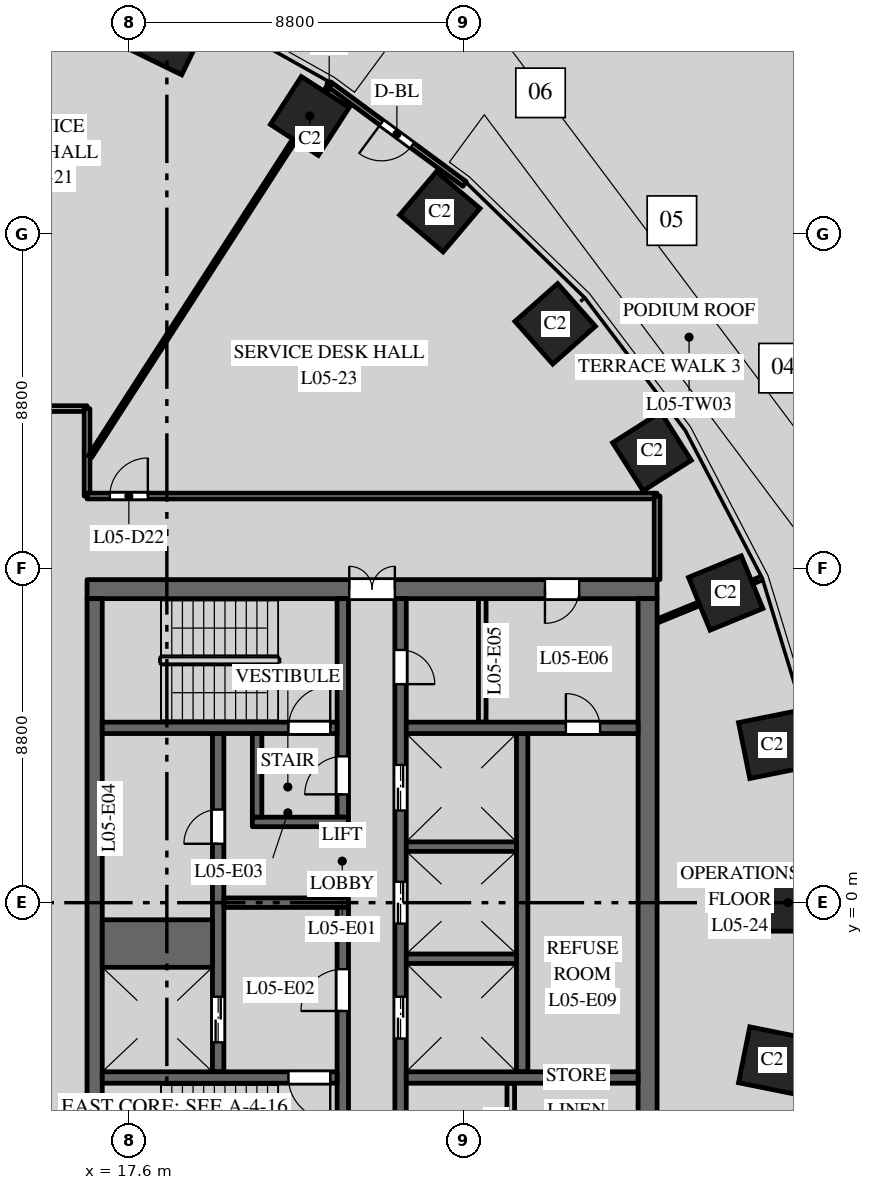
"""IFC4 building model, lengths in metres.
Left out: names, types, materials, properties, quantities, classifications, styles, units other than length and angle.
Written with IfcOpenShell. Run it as: python <this file> out.ifc"""

import sys

from ifc_helpers import new_model, si_unit, direction, frame, frame_2d, origin, origin_2d, place, context, subcontext, project, spatial, rectangle, extrude, element, fill, save


model = new_model("IFC4")
c1 = context("Model", 3, precision=1e-05, world=origin(), true_north=direction((0.0, 1.0)))
c2 = subcontext(c1, "Body", "Model", "MODEL_VIEW")
j1 = project(units=[si_unit("LENGTHUNIT", "METRE"), si_unit("PLANEANGLEUNIT", "RADIAN")], contexts=[c1])
p1 = place(None, origin())
s1 = spatial("IfcSite", under=j1, at=p1, CompositionType="ELEMENT")
p2 = place(p1, origin())
s2 = spatial("IfcBuilding", under=s1, at=p2, CompositionType="ELEMENT")
p3 = place(p2, frame((0.0, 0.0, 30.5)))
s3 = spatial("IfcBuildingStorey", under=s2, at=p3, CompositionType="ELEMENT", Elevation=30.5)
for number, where, z_axis, x_axis in (
    (1, (34.945, 0.0, 0.0), (0.0, 0.0, 1.0), (0.0, 1.0, 0.0)),
    (2, (34.527, 4.151, 0.0), (0.0, 0.0, 1.0), (-0.197, 0.98, 0.0)),
    (3, (33.305, 8.149, 0.0), (0.0, 0.0, 1.0), (-0.379, 0.925, 0.0)),
    (4, (31.365, 11.871, 0.0), (0.0, 0.0, 1.0), (-0.535, 0.845, 0.0)),
    (5, (28.819, 15.23, 0.0), (0.0, 0.0, 1.0), (-0.663, 0.749, 0.0)),
    (6, (25.783, 18.18, 0.0), (0.0, 0.0, 1.0), (-0.763, 0.646, 0.0)),
    (7, (22.362, 20.7, 0.0), (0.0, 0.0, 1.0), (-0.84, 0.542, 0.0)),
    (8, (18.646, 22.785, 0.0), (0.0, 0.0, 1.0), (-0.898, 0.439, 0.0)),
    (9, (34.527, -4.151, 0.0), (0.0, 0.0, 1.0), (0.197, 0.98, 0.0)),
):
    element("IfcColumn", number, at=place(p3, frame(where, z_axis=z_axis, x_axis=x_axis)), inside=s3, PredefinedType="COLUMN", context=c2, shape_type="SweptSolid", body=[
        extrude(rectangle(XDim=1.5, YDim=1.5, at=origin_2d()), origin(), (0.0, 0.0, 1.0), 4.0),
    ])
p4 = place(p3, frame((16.5, 8.25, 0.0), z_axis=(0.0, 0.0, 1.0), x_axis=(1.0, 0.0, 0.0)))
e10 = element("IfcWall", 10, at=p4, inside=s3, PredefinedType="SHEAR", context=c2, shape_type="SweptSolid", body=[
    extrude(rectangle(XDim=15.0, YDim=0.5, at=frame_2d((7.5, 0.0))), origin(), (0.0, 0.0, 1.0), 3.7),
])
p5 = place(p4, frame((6.9, 0.0, 0.0)))
e11 = element("IfcOpeningElement", 11, at=p5, cuts=e10, PredefinedType="OPENING", context=c2, shape_type="SweptSolid", body=[
    extrude(rectangle(XDim=1.2, YDim=2.1, at=frame_2d((0.6, 1.05))), frame((0.0, 0.26, 0.0), z_axis=(0.0, -1.0, 0.0), x_axis=(1.0, 0.0, 0.0)), (0.0, 0.0, 1.0), 0.52),
])
p6 = place(p4, frame((12.05, 0.0, 0.0)))
e12 = element("IfcOpeningElement", 12, at=p6, cuts=e10, PredefinedType="OPENING", context=c2, shape_type="SweptSolid", body=[
    extrude(rectangle(XDim=0.9, YDim=2.1, at=frame_2d((0.45, 1.05))), frame((0.0, 0.26, 0.0), z_axis=(0.0, -1.0, 0.0), x_axis=(1.0, 0.0, 0.0)), (0.0, 0.0, 1.0), 0.52),
])
p7 = place(p3, frame((27.95, -4.45, 0.0), z_axis=(0.0, 0.0, 1.0), x_axis=(0.0, 1.0, 0.0)))
e13 = element("IfcWall", 13, at=p7, inside=s3, PredefinedType="SHEAR", context=c2, shape_type="SweptSolid", body=[
    extrude(rectangle(XDim=8.9, YDim=0.3, at=frame_2d((4.45, 0.0))), origin(), (0.0, 0.0, 1.0), 3.7),
])
p8 = place(p3, frame((19.95, -4.45, 0.0), z_axis=(0.0, 0.0, 1.0), x_axis=(0.0, 1.0, 0.0)))
e14 = element("IfcWall", 14, at=p8, inside=s3, PredefinedType="SHEAR", context=c2, shape_type="SweptSolid", body=[
    extrude(rectangle(XDim=8.9, YDim=0.3, at=frame_2d((4.45, 0.0))), origin(), (0.0, 0.0, 1.0), 3.7),
])
p9 = place(p8, frame((0.775, 0.0, 0.0)))
e15 = element("IfcOpeningElement", 15, at=p9, cuts=e14, PredefinedType="OPENING", context=c2, shape_type="SweptSolid", body=[
    extrude(rectangle(XDim=1.2, YDim=2.1, at=frame_2d((0.6, 1.05))), frame((0.0, 0.16, 0.0), z_axis=(0.0, -1.0, 0.0), x_axis=(1.0, 0.0, 0.0)), (0.0, 0.0, 1.0), 0.32),
])
p10 = place(p8, frame((6.0, 0.0, 0.0)))
e16 = element("IfcOpeningElement", 16, at=p10, cuts=e14, PredefinedType="OPENING", context=c2, shape_type="SweptSolid", body=[
    extrude(rectangle(XDim=0.9, YDim=2.1, at=frame_2d((0.45, 1.05))), frame((0.0, 0.16, 0.0), z_axis=(0.0, -1.0, 0.0), x_axis=(1.0, 0.0, 0.0)), (0.0, 0.0, 1.0), 0.32),
])
p11 = place(p3, frame((24.75, -8.0, 0.0), z_axis=(0.0, 0.0, 1.0), x_axis=(0.0, 1.0, 0.0)))
e17 = element("IfcWall", 17, at=p11, inside=s3, PredefinedType="SHEAR", context=c2, shape_type="SweptSolid", body=[
    extrude(rectangle(XDim=16.0, YDim=0.3, at=frame_2d((8.0, 0.0))), origin(), (0.0, 0.0, 1.0), 3.7),
])
p12 = place(p11, frame((4.425, 0.0, 0.0)))
e18 = element("IfcOpeningElement", 18, at=p12, cuts=e17, PredefinedType="OPENING", context=c2, shape_type="SweptSolid", body=[
    extrude(rectangle(XDim=1.1, YDim=2.1, at=frame_2d((0.55, 1.05))), frame((0.0, 0.16, 0.0), z_axis=(0.0, -1.0, 0.0), x_axis=(1.0, 0.0, 0.0)), (0.0, 0.0, 1.0), 0.32),
])
p13 = place(p11, frame((7.45, 0.0, 0.0)))
e19 = element("IfcOpeningElement", 19, at=p13, cuts=e17, PredefinedType="OPENING", context=c2, shape_type="SweptSolid", body=[
    extrude(rectangle(XDim=1.1, YDim=2.1, at=frame_2d((0.55, 1.05))), frame((0.0, 0.16, 0.0), z_axis=(0.0, -1.0, 0.0), x_axis=(1.0, 0.0, 0.0)), (0.0, 0.0, 1.0), 0.32),
])
p14 = place(p11, frame((10.425, 0.0, 0.0)))
e20 = element("IfcOpeningElement", 20, at=p14, cuts=e17, PredefinedType="OPENING", context=c2, shape_type="SweptSolid", body=[
    extrude(rectangle(XDim=1.2, YDim=2.1, at=frame_2d((0.6, 1.05))), frame((0.0, 0.16, 0.0), z_axis=(0.0, -1.0, 0.0), x_axis=(1.0, 0.0, 0.0)), (0.0, 0.0, 1.0), 0.32),
])
p15 = place(p11, frame((13.75, 0.0, 0.0)))
e21 = element("IfcOpeningElement", 21, at=p15, cuts=e17, PredefinedType="OPENING", context=c2, shape_type="SweptSolid", body=[
    extrude(rectangle(XDim=0.9, YDim=2.1, at=frame_2d((0.45, 1.05))), frame((0.0, 0.16, 0.0), z_axis=(0.0, -1.0, 0.0), x_axis=(1.0, 0.0, 0.0)), (0.0, 0.0, 1.0), 0.32),
])
p16 = place(p11, frame((1.35, 0.0, 0.0)))
e22 = element("IfcOpeningElement", 22, at=p16, cuts=e17, PredefinedType="OPENING", context=c2, shape_type="SweptSolid", body=[
    extrude(rectangle(XDim=0.9, YDim=2.1, at=frame_2d((0.45, 1.05))), frame((0.0, 0.16, 0.0), z_axis=(0.0, -1.0, 0.0), x_axis=(1.0, 0.0, 0.0)), (0.0, 0.0, 1.0), 0.32),
])
p17 = place(p3, frame((20.1, 0.0, 0.0), z_axis=(0.0, 0.0, 1.0), x_axis=(1.0, 0.0, 0.0)))
e23 = element("IfcWall", 23, at=p17, inside=s3, PredefinedType="SHEAR", context=c2, shape_type="SweptSolid", body=[
    extrude(rectangle(XDim=3.28, YDim=0.25, at=frame_2d((1.64, 0.0))), origin(), (0.0, 0.0, 1.0), 3.7),
])
p18 = place(p3, frame((16.7, -8.0, 0.0), z_axis=(0.0, 0.0, 1.0), x_axis=(0.0, 1.0, 0.0)))
e24 = element("IfcWall", 24, at=p18, inside=s3, PredefinedType="SHEAR", context=c2, shape_type="SweptSolid", body=[
    extrude(rectangle(XDim=16.0, YDim=0.4, at=frame_2d((8.0, 0.0))), origin(), (0.0, 0.0, 1.0), 3.7),
])
p19 = place(p3, frame((31.25, -8.0, 0.0), z_axis=(0.0, 0.0, 1.0), x_axis=(0.0, 1.0, 0.0)))
e25 = element("IfcWall", 25, at=p19, inside=s3, PredefinedType="SHEAR", context=c2, shape_type="SweptSolid", body=[
    extrude(rectangle(XDim=16.0, YDim=0.5, at=frame_2d((8.0, 0.0))), origin(), (0.0, 0.0, 1.0), 3.7),
])
p20 = place(p3, frame((24.9, 4.6, 0.0), z_axis=(0.0, 0.0, 1.0), x_axis=(1.0, 0.0, 0.0)))
e26 = element("IfcWall", 26, at=p20, inside=s3, PredefinedType="SHEAR", context=c2, shape_type="SweptSolid", body=[
    extrude(rectangle(XDim=6.1, YDim=0.3, at=frame_2d((3.05, 0.0))), origin(), (0.0, 0.0, 1.0), 3.7),
])
p21 = place(p20, frame((4.2, 0.0, 0.0)))
e27 = element("IfcOpeningElement", 27, at=p21, cuts=e26, PredefinedType="OPENING", context=c2, shape_type="SweptSolid", body=[
    extrude(rectangle(XDim=0.9, YDim=2.1, at=frame_2d((0.45, 1.05))), frame((0.0, 0.16, 0.0), z_axis=(0.0, -1.0, 0.0), x_axis=(1.0, 0.0, 0.0)), (0.0, 0.0, 1.0), 0.32),
])
for number, where, z_axis, x_axis in (
    (28, (26.9, 4.75, 0.0), (0.0, 0.0, 1.0), (0.0, 1.0, 0.0)),
    (29, (27.65, -8.0, 0.0), (0.0, 0.0, 1.0), (0.0, 1.0, 0.0)),
):
    element("IfcWall", number, at=place(p3, frame(where, z_axis=z_axis, x_axis=x_axis)), inside=s3, PredefinedType="PARTITIONING", context=c2, shape_type="SweptSolid", body=[
        extrude(rectangle(XDim=3.25, YDim=0.2, at=frame_2d((1.625, 0.0))), origin(), (0.0, 0.0, 1.0), 3.7),
    ])
p22 = place(p3, frame((24.9, -4.6, 0.0), z_axis=(0.0, 0.0, 1.0), x_axis=(1.0, 0.0, 0.0)))
e30 = element("IfcWall", 30, at=p22, inside=s3, PredefinedType="SHEAR", context=c2, shape_type="SweptSolid", body=[
    extrude(rectangle(XDim=6.1, YDim=0.3, at=frame_2d((3.05, 0.0))), origin(), (0.0, 0.0, 1.0), 3.7),
])
p23 = place(p3, frame((16.9, -1.075, 0.0), z_axis=(0.0, 0.0, 1.0), x_axis=(1.0, 0.0, 0.0)))
e31 = element("IfcWall", 31, at=p23, inside=s3, PredefinedType="SHEAR", context=c2, shape_type="SweptSolid", body=[
    extrude(rectangle(XDim=2.9, YDim=1.25, at=frame_2d((1.45, 0.0))), origin(), (0.0, 0.0, 1.0), 3.7),
])
for number, where, z_axis, x_axis in (
    (32, (24.9, -1.475, 0.0), (0.0, 0.0, 1.0), (1.0, 0.0, 0.0)),
    (33, (24.9, 1.475, 0.0), (0.0, 0.0, 1.0), (1.0, 0.0, 0.0)),
):
    element("IfcWall", number, at=place(p3, frame(where, z_axis=z_axis, x_axis=x_axis)), inside=s3, PredefinedType="SHEAR", context=c2, shape_type="SweptSolid", body=[
        extrude(rectangle(XDim=2.9, YDim=0.25, at=frame_2d((1.45, 0.0))), origin(), (0.0, 0.0, 1.0), 3.7),
    ])
p24 = place(p3, frame((23.23, 2.25, 0.0), z_axis=(0.0, 0.0, 1.0), x_axis=(0.0, 1.0, 0.0)))
e34 = element("IfcWall", 34, at=p24, inside=s3, PredefinedType="SHEAR", context=c2, shape_type="SweptSolid", body=[
    extrude(rectangle(XDim=5.75, YDim=0.3, at=frame_2d((2.875, 0.0))), origin(), (0.0, 0.0, 1.0), 3.7),
])
p25 = place(p24, frame((0.6, 0.0, 0.0)))
e35 = element("IfcOpeningElement", 35, at=p25, cuts=e34, PredefinedType="OPENING", context=c2, shape_type="SweptSolid", body=[
    extrude(rectangle(XDim=1.0, YDim=2.1, at=frame_2d((0.5, 1.05))), frame((0.0, 0.16, 0.0), z_axis=(0.0, -1.0, 0.0), x_axis=(1.0, 0.0, 0.0)), (0.0, 0.0, 1.0), 0.32),
])
p26 = place(p3, frame((23.23, -8.0, 0.0), z_axis=(0.0, 0.0, 1.0), x_axis=(0.0, 1.0, 0.0)))
e36 = element("IfcWall", 36, at=p26, inside=s3, PredefinedType="SHEAR", context=c2, shape_type="SweptSolid", body=[
    extrude(rectangle(XDim=7.875, YDim=0.3, at=frame_2d((3.938, 0.0))), origin(), (0.0, 0.0, 1.0), 3.7),
])
p27 = place(p26, frame((5.15, 0.0, 0.0)))
e37 = element("IfcOpeningElement", 37, at=p27, cuts=e36, PredefinedType="OPENING", context=c2, shape_type="SweptSolid", body=[
    extrude(rectangle(XDim=1.1, YDim=2.1, at=frame_2d((0.55, 1.05))), frame((0.0, 0.16, 0.0), z_axis=(0.0, -1.0, 0.0), x_axis=(1.0, 0.0, 0.0)), (0.0, 0.0, 1.0), 0.32),
])
p28 = place(p3, frame((16.9, 4.6, 0.0), z_axis=(0.0, 0.0, 1.0), x_axis=(1.0, 0.0, 0.0)))
e38 = element("IfcWall", 38, at=p28, inside=s3, PredefinedType="SHEAR", context=c2, shape_type="SweptSolid", body=[
    extrude(rectangle(XDim=6.18, YDim=0.3, at=frame_2d((3.09, 0.0))), origin(), (0.0, 0.0, 1.0), 3.7),
])
p29 = place(p28, frame((4.9, 0.0, 0.0)))
e39 = element("IfcOpeningElement", 39, at=p29, cuts=e38, PredefinedType="OPENING", context=c2, shape_type="SweptSolid", body=[
    extrude(rectangle(XDim=1.1, YDim=2.1, at=frame_2d((0.55, 1.05))), frame((0.0, 0.16, 0.0), z_axis=(0.0, -1.0, 0.0), x_axis=(1.0, 0.0, 0.0)), (0.0, 0.0, 1.0), 0.32),
])
p30 = place(p3, frame((16.9, -4.6, 0.0), z_axis=(0.0, 0.0, 1.0), x_axis=(1.0, 0.0, 0.0)))
e40 = element("IfcWall", 40, at=p30, inside=s3, PredefinedType="SHEAR", context=c2, shape_type="SweptSolid", body=[
    extrude(rectangle(XDim=6.18, YDim=0.3, at=frame_2d((3.09, 0.0))), origin(), (0.0, 0.0, 1.0), 3.7),
])
p31 = place(p30, frame((4.9, 0.0, 0.0)))
e41 = element("IfcOpeningElement", 41, at=p31, cuts=e40, PredefinedType="OPENING", context=c2, shape_type="SweptSolid", body=[
    extrude(rectangle(XDim=1.1, YDim=2.1, at=frame_2d((0.55, 1.05))), frame((0.0, 0.16, 0.0), z_axis=(0.0, -1.0, 0.0), x_axis=(1.0, 0.0, 0.0)), (0.0, 0.0, 1.0), 0.32),
])
p32 = place(p3, frame((20.85, 2.125, 0.0), z_axis=(0.0, 0.0, 1.0), x_axis=(1.0, 0.0, 0.0)))
e42 = element("IfcWall", 42, at=p32, inside=s3, PredefinedType="SHEAR", context=c2, shape_type="SweptSolid", body=[
    extrude(rectangle(XDim=2.53, YDim=0.25, at=frame_2d((1.265, 0.0))), origin(), (0.0, 0.0, 1.0), 3.7),
])
p33 = place(p3, frame((20.975, 2.25, 0.0), z_axis=(0.0, 0.0, 1.0), x_axis=(0.0, 1.0, 0.0)))
e43 = element("IfcWall", 43, at=p33, inside=s3, PredefinedType="SHEAR", context=c2, shape_type="SweptSolid", body=[
    extrude(rectangle(XDim=2.2, YDim=0.25, at=frame_2d((1.1, 0.0))), origin(), (0.0, 0.0, 1.0), 3.7),
])
p34 = place(p3, frame((26.435, 18.911, 0.0), z_axis=(0.0, 0.0, 1.0), x_axis=(-0.805154287598, 0.593065403782, 0.0)))
e44 = element("IfcWall", 44, at=p34, inside=s3, PredefinedType="STANDARD", context=c2, shape_type="SweptSolid", body=[
    extrude(rectangle(XDim=4.425, YDim=0.15, at=frame_2d((2.212, 0.0))), origin(), (0.0, 0.0, 1.0), 3.7),
])
p35 = place(p34, frame((1.712, 0.0, 0.0)))
e45 = element("IfcOpeningElement", 45, at=p35, cuts=e44, PredefinedType="OPENING", context=c2, shape_type="SweptSolid", body=[
    extrude(rectangle(XDim=1.0, YDim=2.4, at=frame_2d((0.5, 1.2))), frame((0.0, 0.085, 0.0), z_axis=(0.0, -1.0, 0.0), x_axis=(1.0, 0.0, 0.0)), (0.0, 0.0, 1.0), 0.17),
])
p36 = place(p3, frame((10.607, 13.0, 0.0), z_axis=(0.0, 0.0, 1.0), x_axis=(1.0, 0.0, 0.0)))
e46 = element("IfcWall", 46, at=p36, inside=s3, PredefinedType="PARTITIONING", context=c2, shape_type="SweptSolid", body=[
    extrude(rectangle(XDim=5.893, YDim=0.15, at=frame_2d((2.947, 0.0))), origin(), (0.0, 0.0, 1.0), 3.7),
])
p37 = place(p36, frame((0.493, 0.0, 0.0)))
e47 = element("IfcOpeningElement", 47, at=p37, cuts=e46, PredefinedType="OPENING", context=c2, shape_type="SweptSolid", body=[
    extrude(rectangle(XDim=1.0, YDim=2.1, at=frame_2d((0.5, 1.05))), frame((0.0, 0.085, 0.0), z_axis=(0.0, -1.0, 0.0), x_axis=(1.0, 0.0, 0.0)), (0.0, 0.0, 1.0), 0.17),
])
p38 = place(p3, frame((16.5, 10.7, 0.0), z_axis=(0.0, 0.0, 1.0), x_axis=(0.0, 1.0, 0.0)))
e48 = element("IfcWall", 48, at=p38, inside=s3, PredefinedType="PARTITIONING", context=c2, shape_type="SweptSolid", body=[
    extrude(rectangle(XDim=2.3, YDim=0.15, at=frame_2d((1.15, 0.0))), origin(), (0.0, 0.0, 1.0), 3.7),
])
p39 = place(p3, frame((16.5, 10.7, 0.0), z_axis=(0.0, 0.0, 1.0), x_axis=(1.0, 0.0, 0.0)))
e49 = element("IfcWall", 49, at=p39, inside=s3, PredefinedType="PARTITIONING", context=c2, shape_type="SweptSolid", body=[
    extrude(rectangle(XDim=15.0, YDim=0.15, at=frame_2d((7.5, 0.0))), origin(), (0.0, 0.0, 1.0), 2.75),
])
p40 = place(p39, frame((0.6, 0.0, 0.0)))
e50 = element("IfcOpeningElement", 50, at=p40, cuts=e49, PredefinedType="OPENING", context=c2, shape_type="SweptSolid", body=[
    extrude(rectangle(XDim=1.0, YDim=2.1, at=frame_2d((0.5, 1.05))), frame((0.0, 0.085, 0.0), z_axis=(0.0, -1.0, 0.0), x_axis=(1.0, 0.0, 0.0)), (0.0, 0.0, 1.0), 0.17),
])
p41 = place(p3, frame((16.575, 11.733, 0.0), z_axis=(0.0, 0.0, 1.0), x_axis=(0.54222594427, 0.840232720953, 0.0)))
e51 = element("IfcWall", 51, at=p41, inside=s3, PredefinedType="PARTITIONING", context=c2, shape_type="SweptSolid", body=[
    extrude(rectangle(XDim=11.674, YDim=0.1, at=frame_2d((5.837, 0.0))), origin(), (0.0, 0.0, 1.0), 3.7),
])
p42 = place(p3, frame((31.5, 7.41, 0.0), z_axis=(0.0, 0.0, 1.0), x_axis=(0.925344112436, 0.379128307542, 0.0)))
e52 = element("IfcWall", 52, at=p42, inside=s3, PredefinedType="PARTITIONING", context=c2, shape_type="SweptSolid", body=[
    extrude(rectangle(XDim=2.954, YDim=0.1, at=frame_2d((1.477, 0.0))), origin(), (0.0, 0.0, 1.0), 3.7),
])
p43 = place(p3, frame((31.5, 8.5, 0.0), z_axis=(0.0, 0.0, 1.0), x_axis=(0.0, 1.0, 0.0)))
e53 = element("IfcWall", 53, at=p43, inside=s3, PredefinedType="PARTITIONING", context=c2, shape_type="SweptSolid", body=[
    extrude(rectangle(XDim=2.2, YDim=0.15, at=frame_2d((1.1, 0.0))), origin(), (0.0, 0.0, 1.0), 2.85),
])
p44 = place(p9, origin())
e54 = element("IfcDoor", 54, at=p44, inside=s3, OperationType="DOUBLE_DOOR_SLIDING", PredefinedType="DOOR", context=c2, shape_type="SweptSolid", body=[
    extrude(rectangle(XDim=1.2, YDim=2.1, at=frame_2d((0.6, 1.05))), frame((0.0, 0.025, 0.0), z_axis=(0.0, -1.0, 0.0), x_axis=(1.0, 0.0, 0.0)), (0.0, 0.0, 1.0), 0.05),
])
fill(e15, e54)
p45 = place(p12, origin())
e55 = element("IfcDoor", 55, at=p45, inside=s3, OperationType="DOUBLE_DOOR_SLIDING", PredefinedType="DOOR", context=c2, shape_type="SweptSolid", body=[
    extrude(rectangle(XDim=1.1, YDim=2.1, at=frame_2d((0.55, 1.05))), frame((0.0, 0.025, 0.0), z_axis=(0.0, -1.0, 0.0), x_axis=(1.0, 0.0, 0.0)), (0.0, 0.0, 1.0), 0.05),
])
fill(e18, e55)
p46 = place(p13, origin())
e56 = element("IfcDoor", 56, at=p46, inside=s3, OperationType="DOUBLE_DOOR_SLIDING", PredefinedType="DOOR", context=c2, shape_type="SweptSolid", body=[
    extrude(rectangle(XDim=1.1, YDim=2.1, at=frame_2d((0.55, 1.05))), frame((0.0, 0.025, 0.0), z_axis=(0.0, -1.0, 0.0), x_axis=(1.0, 0.0, 0.0)), (0.0, 0.0, 1.0), 0.05),
])
fill(e19, e56)
p47 = place(p14, origin())
e57 = element("IfcDoor", 57, at=p47, inside=s3, OperationType="DOUBLE_DOOR_SLIDING", PredefinedType="DOOR", context=c2, shape_type="SweptSolid", body=[
    extrude(rectangle(XDim=1.2, YDim=2.1, at=frame_2d((0.6, 1.05))), frame((0.0, 0.025, 0.0), z_axis=(0.0, -1.0, 0.0), x_axis=(1.0, 0.0, 0.0)), (0.0, 0.0, 1.0), 0.05),
])
fill(e20, e57)
p48 = place(p29, origin())
e58 = element("IfcDoor", 58, at=p48, inside=s3, OperationType="SINGLE_SWING_LEFT", PredefinedType="DOOR", context=c2, shape_type="SweptSolid", body=[
    extrude(rectangle(XDim=1.1, YDim=2.1, at=frame_2d((0.55, 1.05))), frame((0.0, 0.025, 0.0), z_axis=(0.0, -1.0, 0.0), x_axis=(1.0, 0.0, 0.0)), (0.0, 0.0, 1.0), 0.05),
])
fill(e39, e58)
p49 = place(p31, origin())
e59 = element("IfcDoor", 59, at=p49, inside=s3, OperationType="SINGLE_SWING_RIGHT", PredefinedType="DOOR", context=c2, shape_type="SweptSolid", body=[
    extrude(rectangle(XDim=1.1, YDim=2.1, at=frame_2d((0.55, 1.05))), frame((0.0, 0.025, 0.0), z_axis=(0.0, -1.0, 0.0), x_axis=(1.0, 0.0, 0.0)), (0.0, 0.0, 1.0), 0.05),
])
fill(e41, e59)
p50 = place(p27, origin())
e60 = element("IfcDoor", 60, at=p50, inside=s3, OperationType="SINGLE_SWING_RIGHT", PredefinedType="DOOR", context=c2, shape_type="SweptSolid", body=[
    extrude(rectangle(XDim=1.1, YDim=2.1, at=frame_2d((0.55, 1.05))), frame((0.0, 0.025, 0.0), z_axis=(0.0, -1.0, 0.0), x_axis=(1.0, 0.0, 0.0)), (0.0, 0.0, 1.0), 0.05),
])
fill(e37, e60)
p51 = place(p25, origin())
e61 = element("IfcDoor", 61, at=p51, inside=s3, OperationType="SINGLE_SWING_RIGHT", PredefinedType="DOOR", context=c2, shape_type="SweptSolid", body=[
    extrude(rectangle(XDim=1.0, YDim=2.1, at=frame_2d((0.5, 1.05))), frame((0.0, 0.025, 0.0), z_axis=(0.0, -1.0, 0.0), x_axis=(1.0, 0.0, 0.0)), (0.0, 0.0, 1.0), 0.05),
])
fill(e35, e61)
p52 = place(p5, origin())
e62 = element("IfcDoor", 62, at=p52, inside=s3, OperationType="DOUBLE_DOOR_DOUBLE_SWING", PredefinedType="DOOR", context=c2, shape_type="SweptSolid", body=[
    extrude(rectangle(XDim=1.2, YDim=2.1, at=frame_2d((0.6, 1.05))), frame((0.0, 0.025, 0.0), z_axis=(0.0, -1.0, 0.0), x_axis=(1.0, 0.0, 0.0)), (0.0, 0.0, 1.0), 0.05),
])
fill(e11, e62)
p53 = place(p10, origin())
e63 = element("IfcDoor", 63, at=p53, inside=s3, OperationType="SINGLE_SWING_RIGHT", PredefinedType="DOOR", context=c2, shape_type="SweptSolid", body=[
    extrude(rectangle(XDim=0.9, YDim=2.1, at=frame_2d((0.45, 1.05))), frame((0.0, 0.025, 0.0), z_axis=(0.0, -1.0, 0.0), x_axis=(1.0, 0.0, 0.0)), (0.0, 0.0, 1.0), 0.05),
])
fill(e16, e63)
p54 = place(p15, origin())
e64 = element("IfcDoor", 64, at=p54, inside=s3, OperationType="SINGLE_SWING_LEFT", PredefinedType="DOOR", context=c2, shape_type="SweptSolid", body=[
    extrude(rectangle(XDim=0.9, YDim=2.1, at=frame_2d((0.45, 1.05))), frame((0.0, 0.025, 0.0), z_axis=(0.0, -1.0, 0.0), x_axis=(1.0, 0.0, 0.0)), (0.0, 0.0, 1.0), 0.05),
])
fill(e21, e64)
p55 = place(p6, origin())
e65 = element("IfcDoor", 65, at=p55, inside=s3, OperationType="SINGLE_SWING_LEFT", PredefinedType="DOOR", context=c2, shape_type="SweptSolid", body=[
    extrude(rectangle(XDim=0.9, YDim=2.1, at=frame_2d((0.45, 1.05))), frame((0.0, 0.025, 0.0), z_axis=(0.0, -1.0, 0.0), x_axis=(1.0, 0.0, 0.0)), (0.0, 0.0, 1.0), 0.05),
])
fill(e12, e65)
p56 = place(p21, origin())
e66 = element("IfcDoor", 66, at=p56, inside=s3, OperationType="SINGLE_SWING_RIGHT", PredefinedType="DOOR", context=c2, shape_type="SweptSolid", body=[
    extrude(rectangle(XDim=0.9, YDim=2.1, at=frame_2d((0.45, 1.05))), frame((0.0, 0.025, 0.0), z_axis=(0.0, -1.0, 0.0), x_axis=(1.0, 0.0, 0.0)), (0.0, 0.0, 1.0), 0.05),
])
fill(e27, e66)
p57 = place(p35, origin())
e67 = element("IfcDoor", 67, at=p57, inside=s3, OperationType="SINGLE_SWING_RIGHT", PredefinedType="DOOR", context=c2, shape_type="SweptSolid", body=[
    extrude(rectangle(XDim=1.0, YDim=2.4, at=frame_2d((0.5, 1.2))), frame((0.0, 0.025, 0.0), z_axis=(0.0, -1.0, 0.0), x_axis=(1.0, 0.0, 0.0)), (0.0, 0.0, 1.0), 0.05),
])
fill(e45, e67)
p58 = place(p40, origin())
e68 = element("IfcDoor", 68, at=p58, inside=s3, OperationType="SINGLE_SWING_RIGHT", PredefinedType="DOOR", context=c2, shape_type="SweptSolid", body=[
    extrude(rectangle(XDim=1.0, YDim=2.1, at=frame_2d((0.5, 1.05))), frame((0.0, 0.025, 0.0), z_axis=(0.0, -1.0, 0.0), x_axis=(1.0, 0.0, 0.0)), (0.0, 0.0, 1.0), 0.05),
])
fill(e50, e68)
save(model, sys.argv[1])
